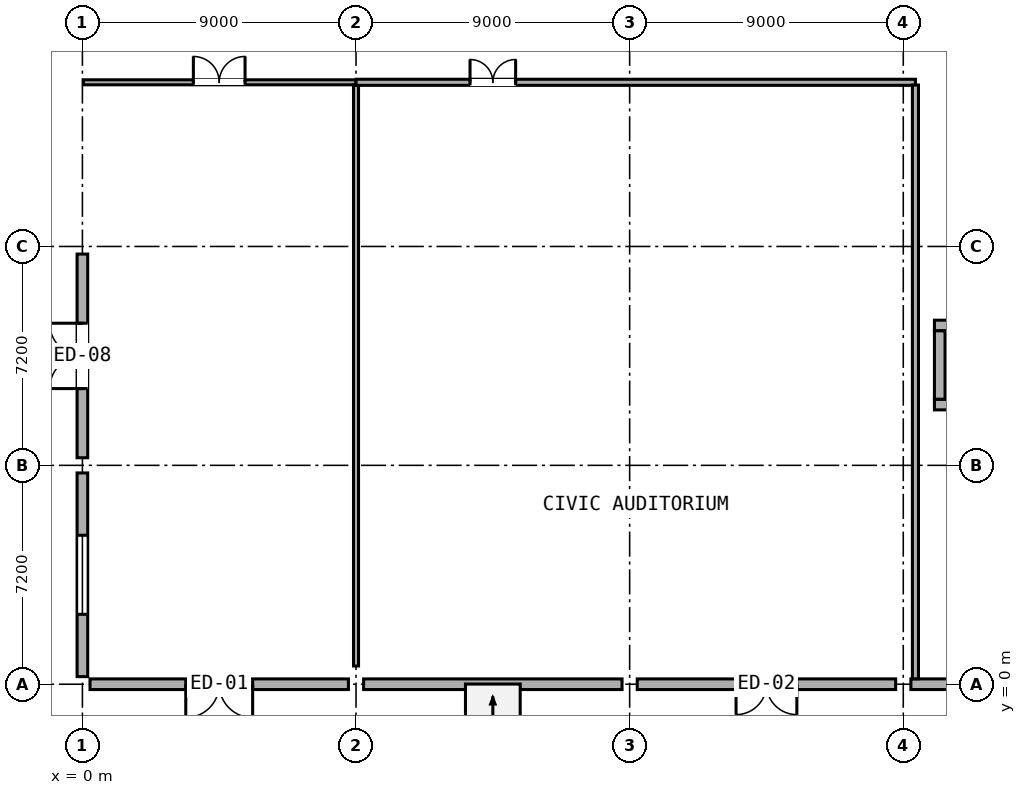
"""IFC4 building model, lengths in metres.
Left out: names, types, materials, properties, quantities, classifications, styles, units other than length and angle.
Written with IfcOpenShell. Run it as: python <this file> out.ifc"""

import sys

from ifc_helpers import new_model, si_unit, direction, frame, frame_2d, origin, origin_2d, place, context, subcontext, project, spatial, rectangle, hollow_rectangle, extrude, element, fill, save


model = new_model("IFC4")
c1 = context("Model", 3, precision=1e-05, world=origin(), true_north=direction((0.0, 1.0)))
c2 = subcontext(c1, "Body", "Model", "MODEL_VIEW")
j1 = project(units=[si_unit("LENGTHUNIT", "METRE"), si_unit("PLANEANGLEUNIT", "RADIAN")], contexts=[c1])
p1 = place(None, origin())
s1 = spatial("IfcSite", under=j1, at=p1, CompositionType="ELEMENT")
p2 = place(p1, origin())
s2 = spatial("IfcBuilding", under=s1, at=p2, CompositionType="ELEMENT")
p3 = place(p2, origin())
s3 = spatial("IfcBuildingStorey", under=s2, at=p3, CompositionType="ELEMENT", Elevation=0.0)
for number, where, z_axis, x_axis in (
    (1, (0.0, 0.0, 0.0), (0.0, 0.0, 1.0), (1.0, 0.0, 0.0)),
    (2, (0.0, 7.2, 0.0), (0.0, 0.0, 1.0), (1.0, 0.0, 0.0)),
    (3, (0.0, 14.4, 0.0), (0.0, 0.0, 1.0), (1.0, 0.0, 0.0)),
    (4, (9.0, 0.0, 0.0), (0.0, 0.0, 1.0), (1.0, 0.0, 0.0)),
):
    element("IfcColumn", number, at=place(p3, frame(where, z_axis=z_axis, x_axis=x_axis)), inside=s3, PredefinedType="COLUMN", context=c2, shape_type="SweptSolid", body=[
        extrude(hollow_rectangle(XDim=0.5, YDim=0.5, WallThickness=0.022, at=origin_2d()), origin(), (0.0, 0.0, 1.0), 4.8),
    ])
for number, where, z_axis, x_axis in (
    (5, (9.0, 7.2, 0.0), (0.0, 0.0, 1.0), (1.0, 0.0, 0.0)),
    (6, (9.0, 14.4, 0.0), (0.0, 0.0, 1.0), (1.0, 0.0, 0.0)),
):
    element("IfcColumn", number, at=place(p3, frame(where, z_axis=z_axis, x_axis=x_axis)), inside=s3, PredefinedType="COLUMN", context=c2, shape_type="SweptSolid", body=[
        extrude(hollow_rectangle(XDim=0.65, YDim=0.65, WallThickness=0.025, at=origin_2d()), origin(), (0.0, 0.0, 1.0), 4.8),
    ])
p4 = place(p3, frame((18.0, 0.0, 0.0), z_axis=(0.0, 0.0, 1.0), x_axis=(1.0, 0.0, 0.0)))
e7 = element("IfcColumn", 7, at=p4, inside=s3, PredefinedType="COLUMN", context=c2, shape_type="SweptSolid", body=[
    extrude(hollow_rectangle(XDim=0.5, YDim=0.5, WallThickness=0.022, at=origin_2d()), origin(), (0.0, 0.0, 1.0), 4.8),
])
p5 = place(p3, frame((18.0, 7.2, 0.0), z_axis=(0.0, 0.0, 1.0), x_axis=(1.0, 0.0, 0.0)))
e8 = element("IfcColumn", 8, at=p5, inside=s3, PredefinedType="COLUMN", context=c2, shape_type="SweptSolid", body=[
    extrude(hollow_rectangle(XDim=0.65, YDim=0.65, WallThickness=0.025, at=origin_2d()), origin(), (0.0, 0.0, 1.0), 4.8),
])
p6 = place(p3, frame((27.0, 0.0, 0.0), z_axis=(0.0, 0.0, 1.0), x_axis=(1.0, 0.0, 0.0)))
e9 = element("IfcColumn", 9, at=p6, inside=s3, PredefinedType="COLUMN", context=c2, shape_type="SweptSolid", body=[
    extrude(hollow_rectangle(XDim=0.5, YDim=0.5, WallThickness=0.022, at=origin_2d()), origin(), (0.0, 0.0, 1.0), 4.8),
])
for number, where, z_axis, x_axis in (
    (10, (27.0, 7.2, 0.0), (0.0, 0.0, 1.0), (1.0, 0.0, 0.0)),
    (11, (27.0, 14.4, 0.0), (0.0, 0.0, 1.0), (1.0, 0.0, 0.0)),
):
    element("IfcColumn", number, at=place(p3, frame(where, z_axis=z_axis, x_axis=x_axis)), inside=s3, PredefinedType="COLUMN", context=c2, shape_type="SweptSolid", body=[
        extrude(hollow_rectangle(XDim=0.65, YDim=0.65, WallThickness=0.025, at=origin_2d()), origin(), (0.0, 0.0, 1.0), 4.8),
    ])
p7 = place(p3, frame((0.25, 0.0, 0.0), z_axis=(0.0, 0.0, 1.0), x_axis=(1.0, 0.0, 0.0)))
e12 = element("IfcWall", 12, at=p7, inside=s3, PredefinedType="STANDARD", context=c2, shape_type="SweptSolid", body=[
    extrude(rectangle(XDim=8.5, YDim=0.35, at=frame_2d((4.25, 0.0))), origin(), (0.0, 0.0, 1.0), 4.055),
])
p8 = place(p7, frame((3.15, 0.0, 0.0)))
e13 = element("IfcOpeningElement", 13, at=p8, cuts=e12, PredefinedType="OPENING", context=c2, shape_type="SweptSolid", body=[
    extrude(rectangle(XDim=2.2, YDim=2.5, at=frame_2d((1.1, 1.25))), frame((0.0, 0.187, 0.0), z_axis=(0.0, -1.0, 0.0), x_axis=(1.0, 0.0, 0.0)), (0.0, 0.0, 1.0), 0.374),
])
p9 = place(p3, frame((9.25, 0.0, 0.0), z_axis=(0.0, 0.0, 1.0), x_axis=(1.0, 0.0, 0.0)))
e14 = element("IfcWall", 14, at=p9, inside=s3, PredefinedType="STANDARD", context=c2, shape_type="SweptSolid", body=[
    extrude(rectangle(XDim=8.5, YDim=0.35, at=frame_2d((4.25, 0.0))), origin(), (0.0, 0.0, 1.0), 4.055),
])
p10 = place(p3, frame((18.25, 0.0, 0.0), z_axis=(0.0, 0.0, 1.0), x_axis=(1.0, 0.0, 0.0)))
e15 = element("IfcWall", 15, at=p10, inside=s3, PredefinedType="STANDARD", context=c2, shape_type="SweptSolid", body=[
    extrude(rectangle(XDim=8.5, YDim=0.35, at=frame_2d((4.25, 0.0))), origin(), (0.0, 0.0, 1.0), 4.055),
])
p11 = place(p10, frame((3.25, 0.0, 0.0)))
e16 = element("IfcOpeningElement", 16, at=p11, cuts=e15, PredefinedType="OPENING", context=c2, shape_type="SweptSolid", body=[
    extrude(rectangle(XDim=2.0, YDim=2.45, at=frame_2d((1.0, 1.225))), frame((0.0, 0.187, 0.0), z_axis=(0.0, -1.0, 0.0), x_axis=(1.0, 0.0, 0.0)), (0.0, 0.0, 1.0), 0.374),
])
p12 = place(p3, frame((27.25, 0.0, 0.0), z_axis=(0.0, 0.0, 1.0), x_axis=(1.0, 0.0, 0.0)))
e17 = element("IfcWall", 17, at=p12, inside=s3, PredefinedType="STANDARD", context=c2, shape_type="SweptSolid", body=[
    extrude(rectangle(XDim=8.5, YDim=0.35, at=frame_2d((4.25, 0.0))), origin(), (0.0, 0.0, 1.0), 4.055),
])
p13 = place(p3, frame((0.0, 0.25, 0.0), z_axis=(0.0, 0.0, 1.0), x_axis=(0.0, 1.0, 0.0)))
e18 = element("IfcWall", 18, at=p13, inside=s3, PredefinedType="STANDARD", context=c2, shape_type="SweptSolid", body=[
    extrude(rectangle(XDim=6.7, YDim=0.35, at=frame_2d((3.35, 0.0))), origin(), (0.0, 0.0, 1.0), 4.055),
])
p14 = place(p13, frame((2.05, 0.0, 0.85)))
e19 = element("IfcOpeningElement", 19, at=p14, cuts=e18, PredefinedType="OPENING", context=c2, shape_type="SweptSolid", body=[
    extrude(rectangle(XDim=2.6, YDim=1.6, at=frame_2d((1.3, 0.8))), frame((0.0, 0.187, 0.0), z_axis=(0.0, -1.0, 0.0), x_axis=(1.0, 0.0, 0.0)), (0.0, 0.0, 1.0), 0.374),
])
p15 = place(p3, frame((0.0, 7.45, 0.0), z_axis=(0.0, 0.0, 1.0), x_axis=(0.0, 1.0, 0.0)))
e20 = element("IfcWall", 20, at=p15, inside=s3, PredefinedType="STANDARD", context=c2, shape_type="SweptSolid", body=[
    extrude(rectangle(XDim=6.7, YDim=0.35, at=frame_2d((3.35, 0.0))), origin(), (0.0, 0.0, 1.0), 4.055),
])
p16 = place(p15, frame((2.275, 0.0, 0.0)))
e21 = element("IfcOpeningElement", 21, at=p16, cuts=e20, PredefinedType="OPENING", context=c2, shape_type="SweptSolid", body=[
    extrude(rectangle(XDim=2.15, YDim=2.48, at=frame_2d((1.075, 1.24))), frame((0.0, 0.187, 0.0), z_axis=(0.0, -1.0, 0.0), x_axis=(1.0, 0.0, 0.0)), (0.0, 0.0, 1.0), 0.374),
])
p17 = place(p3, frame((28.025, 9.2, 0.0), z_axis=(0.0, 0.0, 1.0), x_axis=(1.0, 0.0, 0.0)))
e22 = element("IfcWall", 22, at=p17, inside=s3, PredefinedType="SHEAR", context=c2, shape_type="SweptSolid", body=[
    extrude(rectangle(XDim=2.75, YDim=0.35, at=frame_2d((1.375, 0.0))), origin(), (0.0, 0.0, 1.0), 4.555),
])
p18 = place(p3, frame((28.025, 11.8, 0.0), z_axis=(0.0, 0.0, 1.0), x_axis=(1.0, 0.0, 0.0)))
e23 = element("IfcWall", 23, at=p18, inside=s3, PredefinedType="SHEAR", context=c2, shape_type="SweptSolid", body=[
    extrude(rectangle(XDim=2.75, YDim=0.35, at=frame_2d((1.375, 0.0))), origin(), (0.0, 0.0, 1.0), 4.555),
])
p19 = place(p18, frame((0.825, 0.0, 0.0)))
e24 = element("IfcOpeningElement", 24, at=p19, cuts=e23, PredefinedType="OPENING", context=c2, shape_type="SweptSolid", body=[
    extrude(rectangle(XDim=1.1, YDim=2.1, at=frame_2d((0.55, 1.05))), frame((0.0, 0.187, 0.0), z_axis=(0.0, -1.0, 0.0), x_axis=(1.0, 0.0, 0.0)), (0.0, 0.0, 1.0), 0.374),
])
p20 = place(p3, frame((28.2, 9.375, 0.0), z_axis=(0.0, 0.0, 1.0), x_axis=(0.0, 1.0, 0.0)))
e25 = element("IfcWall", 25, at=p20, inside=s3, PredefinedType="SHEAR", context=c2, shape_type="SweptSolid", body=[
    extrude(rectangle(XDim=2.25, YDim=0.35, at=frame_2d((1.125, 0.0))), origin(), (0.0, 0.0, 1.0), 4.555),
])
p21 = place(p3, frame((0.035, 19.8, 0.0), z_axis=(0.0, 0.0, 1.0), x_axis=(1.0, 0.0, 0.0)))
e26 = element("IfcWall", 26, at=p21, inside=s3, PredefinedType="PARTITIONING", context=c2, shape_type="SweptSolid", body=[
    extrude(rectangle(XDim=8.965, YDim=0.165, at=frame_2d((4.482, 0.0))), origin(), (0.0, 0.0, 1.0), 4.555),
])
p22 = place(p21, frame((3.615, 0.0, 0.0)))
e27 = element("IfcOpeningElement", 27, at=p22, cuts=e26, PredefinedType="OPENING", context=c2, shape_type="SweptSolid", body=[
    extrude(rectangle(XDim=1.7, YDim=2.12, at=frame_2d((0.85, 1.06))), frame((0.0, 0.094, 0.0), z_axis=(0.0, -1.0, 0.0), x_axis=(1.0, 0.0, 0.0)), (0.0, 0.0, 1.0), 0.189),
])
p23 = place(p3, frame((9.0, 0.6, 0.0), z_axis=(0.0, 0.0, 1.0), x_axis=(0.0, 1.0, 0.0)))
e28 = element("IfcWall", 28, at=p23, inside=s3, PredefinedType="PARTITIONING", context=c2, shape_type="SweptSolid", body=[
    extrude(rectangle(XDim=19.11, YDim=0.165, at=frame_2d((9.555, 0.0))), origin(), (0.0, 0.0, 1.0), 3.835),
])
p24 = place(p3, frame((9.0, 19.8, 0.0), z_axis=(0.0, 0.0, 1.0), x_axis=(1.0, 0.0, 0.0)))
e29 = element("IfcWall", 29, at=p24, inside=s3, PredefinedType="PARTITIONING", context=c2, shape_type="SweptSolid", body=[
    extrude(rectangle(XDim=18.4, YDim=0.2, at=frame_2d((9.2, 0.0))), origin(), (0.0, 0.0, 1.0), 4.555),
])
p25 = place(p24, frame((3.75, 0.0, 0.0)))
e30 = element("IfcOpeningElement", 30, at=p25, cuts=e29, PredefinedType="OPENING", context=c2, shape_type="SweptSolid", body=[
    extrude(rectangle(XDim=1.5, YDim=2.1, at=frame_2d((0.75, 1.05))), frame((0.0, 0.112, 0.0), z_axis=(0.0, -1.0, 0.0), x_axis=(1.0, 0.0, 0.0)), (0.0, 0.0, 1.0), 0.224),
])
p26 = place(p3, frame((27.4, 0.18, 0.0), z_axis=(0.0, 0.0, 1.0), x_axis=(0.0, 1.0, 0.0)))
e31 = element("IfcWall", 31, at=p26, inside=s3, PredefinedType="PARTITIONING", context=c2, shape_type="SweptSolid", body=[
    extrude(rectangle(XDim=19.53, YDim=0.2, at=frame_2d((9.765, 0.0))), origin(), (0.0, 0.0, 1.0), 4.555),
])
p27 = place(p8, frame((2.2, 0.0, 0.0), z_axis=(0.0, 0.0, 1.0), x_axis=(-1.0, 0.0, 0.0)))
e32 = element("IfcDoor", 32, at=p27, inside=s3, OperationType="DOUBLE_DOOR_SINGLE_SWING", PredefinedType="DOOR", context=c2, shape_type="SweptSolid", body=[
    extrude(rectangle(XDim=2.2, YDim=2.5, at=frame_2d((1.1, 1.25))), frame((0.0, 0.025, 0.0), z_axis=(0.0, -1.0, 0.0), x_axis=(1.0, 0.0, 0.0)), (0.0, 0.0, 1.0), 0.05),
])
fill(e13, e32)
p28 = place(p11, frame((2.0, 0.0, 0.0), z_axis=(0.0, 0.0, 1.0), x_axis=(-1.0, 0.0, 0.0)))
e33 = element("IfcDoor", 33, at=p28, inside=s3, OperationType="DOUBLE_DOOR_SINGLE_SWING", PredefinedType="DOOR", context=c2, shape_type="SweptSolid", body=[
    extrude(rectangle(XDim=2.0, YDim=2.45, at=frame_2d((1.0, 1.225))), frame((0.0, 0.025, 0.0), z_axis=(0.0, -1.0, 0.0), x_axis=(1.0, 0.0, 0.0)), (0.0, 0.0, 1.0), 0.05),
])
fill(e16, e33)
p29 = place(p14, origin())
e34 = element("IfcWindow", 34, at=p29, inside=s3, PartitioningType="DOUBLE_PANEL_VERTICAL", PredefinedType="WINDOW", context=c2, shape_type="SweptSolid", body=[
    extrude(rectangle(XDim=2.6, YDim=1.6, at=frame_2d((1.3, 0.8))), frame((0.0, 0.03, 0.0), z_axis=(0.0, -1.0, 0.0), x_axis=(1.0, 0.0, 0.0)), (0.0, 0.0, 1.0), 0.06),
])
fill(e19, e34)
p30 = place(p16, origin())
e35 = element("IfcDoor", 35, at=p30, inside=s3, OperationType="DOUBLE_DOOR_SINGLE_SWING", PredefinedType="DOOR", context=c2, shape_type="SweptSolid", body=[
    extrude(rectangle(XDim=2.15, YDim=2.48, at=frame_2d((1.075, 1.24))), frame((0.0, 0.025, 0.0), z_axis=(0.0, -1.0, 0.0), x_axis=(1.0, 0.0, 0.0)), (0.0, 0.0, 1.0), 0.05),
])
fill(e21, e35)
p31 = place(p22, origin())
e36 = element("IfcDoor", 36, at=p31, inside=s3, OperationType="DOUBLE_DOOR_SINGLE_SWING", PredefinedType="DOOR", context=c2, shape_type="SweptSolid", body=[
    extrude(rectangle(XDim=1.7, YDim=2.12, at=frame_2d((0.85, 1.06))), frame((0.0, 0.025, 0.0), z_axis=(0.0, -1.0, 0.0), x_axis=(1.0, 0.0, 0.0)), (0.0, 0.0, 1.0), 0.05),
])
fill(e27, e36)
p32 = place(p25, origin())
e37 = element("IfcDoor", 37, at=p32, inside=s3, OperationType="DOUBLE_DOOR_SINGLE_SWING", PredefinedType="DOOR", context=c2, shape_type="SweptSolid", body=[
    extrude(rectangle(XDim=1.5, YDim=2.1, at=frame_2d((0.75, 1.05))), frame((0.0, 0.025, 0.0), z_axis=(0.0, -1.0, 0.0), x_axis=(1.0, 0.0, 0.0)), (0.0, 0.0, 1.0), 0.05),
])
fill(e30, e37)
save(model, sys.argv[1])
